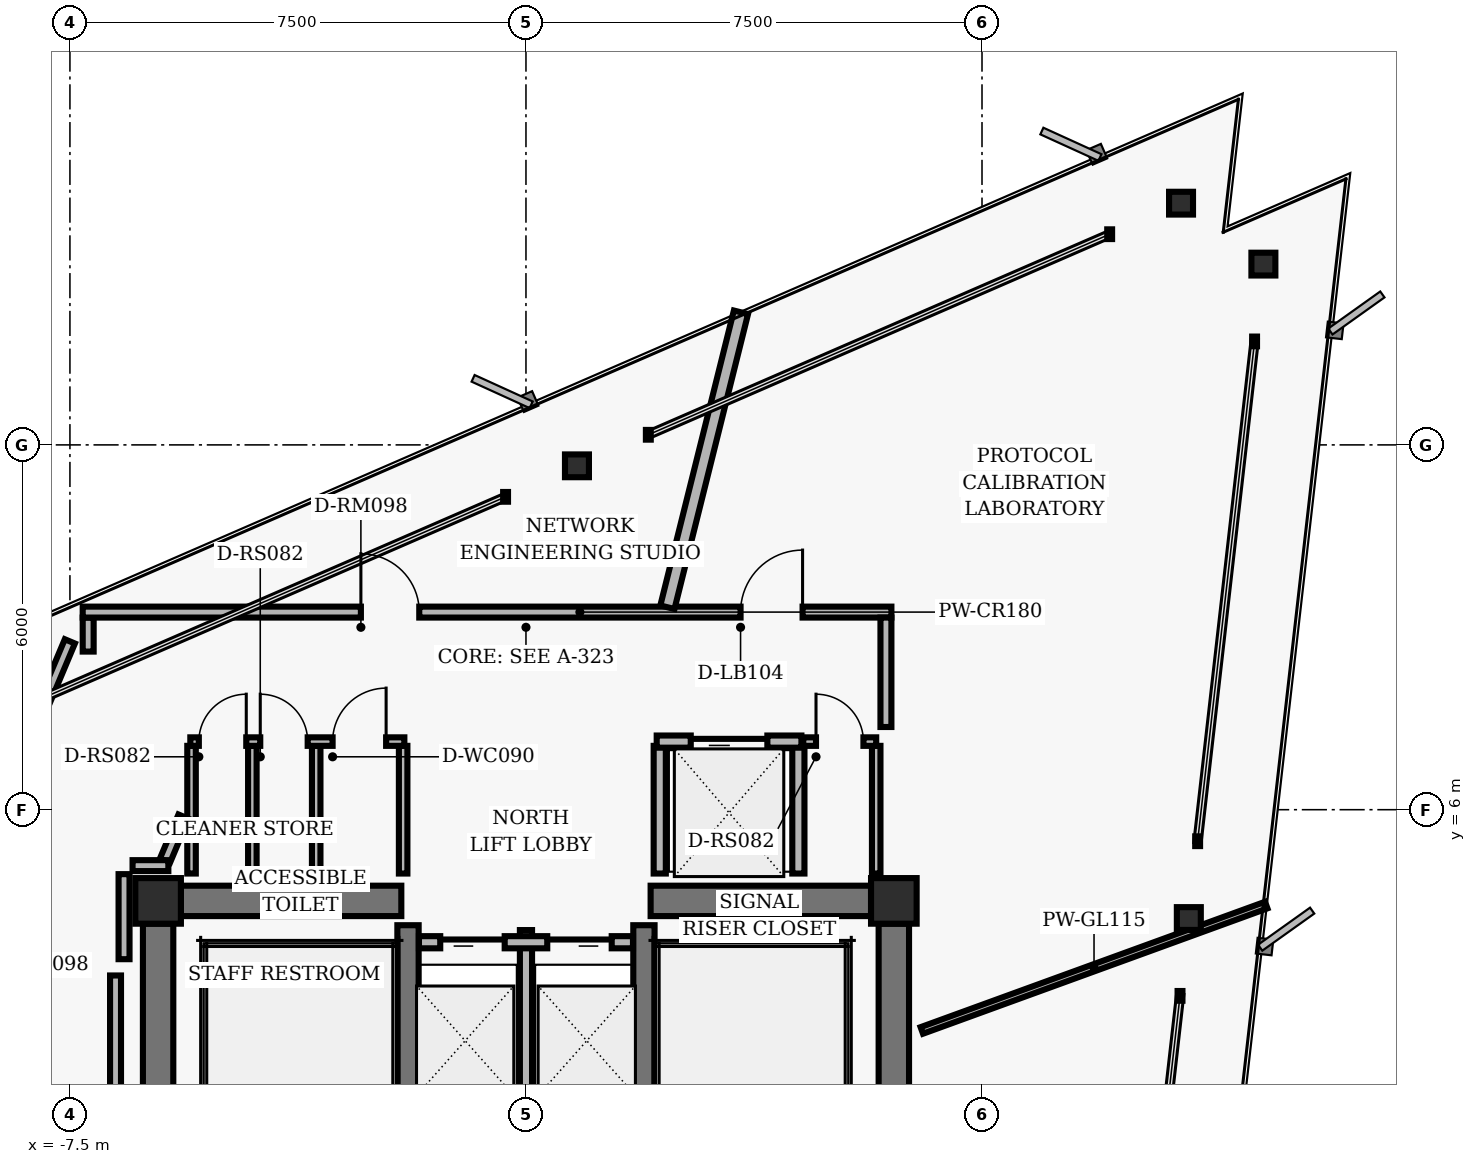
"""IFC4 building model, lengths in metres.
Left out: names, types, materials, properties, quantities, classifications, styles, units other than length and angle.
Written with IfcOpenShell. Run it as: python <this file> out.ifc"""

import sys

from ifc_helpers import new_model, si_unit, direction, frame, frame_2d, origin, origin_2d, place, context, subcontext, project, spatial, rectangle, hollow_rectangle, i_section, extrude, element, fill, save


model = new_model("IFC4")
c1 = context("Model", 3, precision=1e-05, world=origin(), true_north=direction((0.0, 1.0)))
c2 = subcontext(c1, "Body", "Model", "MODEL_VIEW")
j1 = project(units=[si_unit("LENGTHUNIT", "METRE"), si_unit("PLANEANGLEUNIT", "RADIAN")], contexts=[c1])
p1 = place(None, origin())
s1 = spatial("IfcSite", under=j1, at=p1, CompositionType="ELEMENT")
p2 = place(p1, origin())
s2 = spatial("IfcBuilding", under=s1, at=p2, CompositionType="ELEMENT")
p3 = place(p2, frame((0.0, 0.0, 217.92)))
s3 = spatial("IfcBuildingStorey", under=s2, at=p3, CompositionType="ELEMENT", Elevation=217.92)
for number, where, z_axis, x_axis in (
    (1, (-6.05, 4.5, 0.0), (0.0, 0.0, 1.0), (1.0, 0.0, 0.0)),
    (2, (6.05, 4.5, 0.0), (0.0, 0.0, 1.0), (1.0, 0.0, 0.0)),
):
    element("IfcColumn", number, at=place(p3, frame(where, z_axis=z_axis, x_axis=x_axis)), inside=s3, PredefinedType="COLUMN", context=c2, shape_type="SweptSolid", body=[
        extrude(hollow_rectangle(XDim=0.75, YDim=0.75, WallThickness=0.05, InnerFilletRadius=0.02, OuterFilletRadius=0.04, at=origin_2d()), origin(), (0.0, 0.0, 1.0), 3.04),
    ])
for number, where, z_axis, x_axis in (
    (3, (-6.05, 0.375, 0.0), (0.0, 0.0, 1.0), (0.0, 1.0, 0.0)),
    (4, (6.05, 0.375, 0.0), (0.0, 0.0, 1.0), (0.0, 1.0, 0.0)),
):
    element("IfcWall", number, at=place(p3, frame(where, z_axis=z_axis, x_axis=x_axis)), inside=s3, PredefinedType="SHEAR", context=c2, shape_type="SweptSolid", body=[
        extrude(rectangle(XDim=3.75, YDim=0.5, at=frame_2d((1.875, 0.0))), origin(), (0.0, 0.0, 1.0), 2.798),
    ])
for number, where, z_axis, x_axis in (
    (5, (-1.94, -4.1, 0.0), (0.0, 0.0, 1.0), (0.0, 1.0, 0.0)),
    (6, (1.94, -4.1, 0.0), (0.0, 0.0, 1.0), (0.0, 1.0, 0.0)),
):
    element("IfcWall", number, at=place(p3, frame(where, z_axis=z_axis, x_axis=x_axis)), inside=s3, PredefinedType="SHEAR", context=c2, shape_type="SweptSolid", body=[
        extrude(rectangle(XDim=8.2, YDim=0.35, at=frame_2d((4.1, 0.0))), origin(), (0.0, 0.0, 1.0), 2.798),
    ])
for number, where, z_axis, x_axis in (
    (7, (-5.675, 4.5, 0.0), (0.0, 0.0, 1.0), (1.0, 0.0, 0.0)),
    (8, (2.05, 4.5, 0.0), (0.0, 0.0, 1.0), (1.0, 0.0, 0.0)),
):
    element("IfcWall", number, at=place(p3, frame(where, z_axis=z_axis, x_axis=x_axis)), inside=s3, PredefinedType="SHEAR", context=c2, shape_type="SweptSolid", body=[
        extrude(rectangle(XDim=3.625, YDim=0.5, at=frame_2d((1.812, 0.0))), origin(), (0.0, 0.0, 1.0), 2.798),
    ])
for number, where, z_axis, x_axis in (
    (9, (10.901, 4.21, 0.0), (0.0, 0.0, 1.0), (1.0, 0.0, 0.0)),
    (10, (12.128, 14.973, 0.0), (0.0, 0.0, 1.0), (1.0, 0.0, 0.0)),
    (11, (10.773, 15.976, 0.0), (0.0, 0.0, 1.0), (1.0, 0.0, 0.0)),
    (12, (0.838, 11.656, 0.0), (0.0, 0.0, 1.0), (1.0, 0.0, 0.0)),
):
    element("IfcColumn", number, at=place(p3, frame(where, z_axis=z_axis, x_axis=x_axis)), inside=s3, PredefinedType="COLUMN", context=c2, shape_type="SweptSolid", body=[
        extrude(i_section(OverallWidth=0.394, OverallDepth=0.375, WebThickness=0.017, FlangeThickness=0.028, FilletRadius=0.016, at=origin_2d()), origin(), (0.0, 0.0, 1.0), 3.04),
    ])
p4 = place(p3, frame((0.0, 1.25, 0.0), z_axis=(0.0, 0.0, 1.0), x_axis=(0.0, 1.0, 0.0)))
e13 = element("IfcWall", 13, at=p4, inside=s3, PredefinedType="PARTITIONING", context=c2, shape_type="SweptSolid", body=[
    extrude(rectangle(XDim=2.77, YDim=0.2, at=frame_2d((1.385, 0.0))), origin(), (0.0, 0.0, 1.0), 2.773),
])
p5 = place(p3, frame((-1.76, 3.82, 0.0), z_axis=(0.0, 0.0, 1.0), x_axis=(1.0, 0.0, 0.0)))
e14 = element("IfcWall", 14, at=p5, inside=s3, PredefinedType="PARTITIONING", context=c2, shape_type="SweptSolid", body=[
    extrude(rectangle(XDim=3.52, YDim=0.2, at=frame_2d((1.76, 0.0))), origin(), (0.0, 0.0, 1.0), 2.773),
])
p6 = place(p5, frame((0.35, 0.0, 0.0)))
e15 = element("IfcOpeningElement", 15, at=p6, cuts=e14, PredefinedType="OPENING", context=c2, shape_type="SweptSolid", body=[
    extrude(rectangle(XDim=1.06, YDim=2.04, at=frame_2d((0.53, 1.02))), frame((0.0, 0.11, 0.0), z_axis=(0.0, -1.0, 0.0), x_axis=(1.0, 0.0, 0.0)), (0.0, 0.0, 1.0), 0.22),
])
p7 = place(p5, frame((2.11, 0.0, 0.0)))
e16 = element("IfcOpeningElement", 16, at=p7, cuts=e14, PredefinedType="OPENING", context=c2, shape_type="SweptSolid", body=[
    extrude(rectangle(XDim=1.06, YDim=2.04, at=frame_2d((0.53, 1.02))), frame((0.0, 0.11, 0.0), z_axis=(0.0, -1.0, 0.0), x_axis=(1.0, 0.0, 0.0)), (0.0, 0.0, 1.0), 0.22),
])
for number, where, z_axis, x_axis in (
    (17, (2.2, 4.95, 0.0), (0.0, 0.0, 1.0), (0.0, 1.0, 0.0)),
    (18, (4.48, 4.95, 0.0), (0.0, 0.0, 1.0), (0.0, 1.0, 0.0)),
):
    element("IfcWall", number, at=place(p3, frame(where, z_axis=z_axis, x_axis=x_axis)), inside=s3, PredefinedType="PARTITIONING", context=c2, shape_type="SweptSolid", body=[
        extrude(rectangle(XDim=2.1, YDim=0.2, at=frame_2d((1.05, 0.0))), origin(), (0.0, 0.0, 1.0), 2.773),
    ])
p8 = place(p3, frame((2.15, 7.12, 0.0), z_axis=(0.0, 0.0, 1.0), x_axis=(1.0, 0.0, 0.0)))
e19 = element("IfcWall", 19, at=p8, inside=s3, PredefinedType="PARTITIONING", context=c2, shape_type="SweptSolid", body=[
    extrude(rectangle(XDim=2.38, YDim=0.2, at=frame_2d((1.19, 0.0))), origin(), (0.0, 0.0, 1.0), 2.395),
])
p9 = place(p8, frame((0.56, 0.0, 0.0)))
e20 = element("IfcOpeningElement", 20, at=p9, cuts=e19, PredefinedType="OPENING", context=c2, shape_type="SweptSolid", body=[
    extrude(rectangle(XDim=1.26, YDim=2.06, at=frame_2d((0.63, 1.03))), frame((0.0, 0.11, 0.0), z_axis=(0.0, -1.0, 0.0), x_axis=(1.0, 0.0, 0.0)), (0.0, 0.0, 1.0), 0.22),
])
for number, where, z_axis, x_axis in (
    (21, (-5.5, 4.95, 0.0), (0.0, 0.0, 1.0), (0.0, 1.0, 0.0)),
    (22, (-4.5, 4.95, 0.0), (0.0, 0.0, 1.0), (0.0, 1.0, 0.0)),
    (23, (-3.45, 4.95, 0.0), (0.0, 0.0, 1.0), (0.0, 1.0, 0.0)),
    (24, (-2.02, 4.95, 0.0), (0.0, 0.0, 1.0), (0.0, 1.0, 0.0)),
):
    element("IfcWall", number, at=place(p3, frame(where, z_axis=z_axis, x_axis=x_axis)), inside=s3, PredefinedType="PARTITIONING", context=c2, shape_type="SweptSolid", body=[
        extrude(rectangle(XDim=2.1, YDim=0.14, at=frame_2d((1.05, 0.0))), origin(), (0.0, 0.0, 1.0), 2.773),
    ])
p10 = place(p3, frame((-5.52, 7.12, 0.0), z_axis=(0.0, 0.0, 1.0), x_axis=(1.0, 0.0, 0.0)))
e25 = element("IfcWall", 25, at=p10, inside=s3, PredefinedType="PARTITIONING", context=c2, shape_type="SweptSolid", body=[
    extrude(rectangle(XDim=3.52, YDim=0.14, at=frame_2d((1.76, 0.0))), origin(), (0.0, 0.0, 1.0), 2.395),
])
p11 = place(p10, frame((0.14, 0.0, 0.0)))
e26 = element("IfcOpeningElement", 26, at=p11, cuts=e25, PredefinedType="OPENING", context=c2, shape_type="SweptSolid", body=[
    extrude(rectangle(XDim=0.78, YDim=2.01, at=frame_2d((0.39, 1.005))), frame((0.0, 0.08, 0.0), z_axis=(0.0, -1.0, 0.0), x_axis=(1.0, 0.0, 0.0)), (0.0, 0.0, 1.0), 0.16),
])
p12 = place(p10, frame((1.15, 0.0, 0.0)))
e27 = element("IfcOpeningElement", 27, at=p12, cuts=e25, PredefinedType="OPENING", context=c2, shape_type="SweptSolid", body=[
    extrude(rectangle(XDim=0.78, YDim=2.01, at=frame_2d((0.39, 1.005))), frame((0.0, 0.08, 0.0), z_axis=(0.0, -1.0, 0.0), x_axis=(1.0, 0.0, 0.0)), (0.0, 0.0, 1.0), 0.16),
])
p13 = place(p10, frame((2.34, 0.0, 0.0)))
e28 = element("IfcOpeningElement", 28, at=p13, cuts=e25, PredefinedType="OPENING", context=c2, shape_type="SweptSolid", body=[
    extrude(rectangle(XDim=0.88, YDim=2.02, at=frame_2d((0.44, 1.01))), frame((0.0, 0.08, 0.0), z_axis=(0.0, -1.0, 0.0), x_axis=(1.0, 0.0, 0.0)), (0.0, 0.0, 1.0), 0.16),
])
p14 = place(p3, frame((5.76, 4.95, 0.0), z_axis=(0.0, 0.0, 1.0), x_axis=(0.0, 1.0, 0.0)))
e29 = element("IfcWall", 29, at=p14, inside=s3, PredefinedType="PARTITIONING", context=c2, shape_type="SweptSolid", body=[
    extrude(rectangle(XDim=2.1, YDim=0.14, at=frame_2d((1.05, 0.0))), origin(), (0.0, 0.0, 1.0), 2.773),
])
p15 = place(p3, frame((4.56, 7.12, 0.0), z_axis=(0.0, 0.0, 1.0), x_axis=(1.0, 0.0, 0.0)))
e30 = element("IfcWall", 30, at=p15, inside=s3, PredefinedType="PARTITIONING", context=c2, shape_type="SweptSolid", body=[
    extrude(rectangle(XDim=1.2, YDim=0.14, at=frame_2d((0.6, 0.0))), origin(), (0.0, 0.0, 1.0), 2.773),
])
p16 = place(p15, frame((0.21, 0.0, 0.0)))
e31 = element("IfcOpeningElement", 31, at=p16, cuts=e30, PredefinedType="OPENING", context=c2, shape_type="SweptSolid", body=[
    extrude(rectangle(XDim=0.78, YDim=2.01, at=frame_2d((0.39, 1.005))), frame((0.0, 0.08, 0.0), z_axis=(0.0, -1.0, 0.0), x_axis=(1.0, 0.0, 0.0)), (0.0, 0.0, 1.0), 0.16),
])
p17 = place(p3, frame((-9.367, 4.332, 0.0), z_axis=(0.0, 0.0, 1.0), x_axis=(0.387573945081, 0.921838617706, 0.0)))
e32 = element("IfcWall", 32, at=p17, inside=s3, PredefinedType="PARTITIONING", context=c2, shape_type="SweptSolid", body=[
    extrude(rectangle(XDim=4.813, YDim=0.18, at=frame_2d((2.407, 0.0))), origin(), (0.0, 0.0, 1.0), 2.773),
])
p18 = place(p17, frame((0.302, 0.0, 0.0)))
e33 = element("IfcOpeningElement", 33, at=p18, cuts=e32, PredefinedType="OPENING", context=c2, shape_type="SweptSolid", body=[
    extrude(rectangle(XDim=0.96, YDim=2.02, at=frame_2d((0.48, 1.01))), frame((0.0, 0.1, 0.0), z_axis=(0.0, -1.0, 0.0), x_axis=(1.0, 0.0, 0.0)), (0.0, 0.0, 1.0), 0.2),
])
p19 = place(p3, frame((-7.2, 8.601, 0.0), z_axis=(0.0, 0.0, 1.0), x_axis=(0.0, 1.0, 0.0)))
e34 = element("IfcWall", 34, at=p19, inside=s3, PredefinedType="PARTITIONING", context=c2, shape_type="SweptSolid", body=[
    extrude(rectangle(XDim=0.559, YDim=0.18, at=frame_2d((0.28, 0.0))), origin(), (0.0, 0.0, 1.0), 2.773),
])
p20 = place(p3, frame((-7.29, 9.25, 0.0), z_axis=(0.0, 0.0, 1.0), x_axis=(1.0, 0.0, 0.0)))
e35 = element("IfcWall", 35, at=p20, inside=s3, PredefinedType="PARTITIONING", context=c2, shape_type="SweptSolid", body=[
    extrude(rectangle(XDim=13.3, YDim=0.18, at=frame_2d((6.65, 0.0))), origin(), (0.0, 0.0, 1.0), 2.395),
])
p21 = place(p20, frame((10.819, 0.0, 0.0)))
e36 = element("IfcOpeningElement", 36, at=p21, cuts=e35, PredefinedType="OPENING", context=c2, shape_type="SweptSolid", body=[
    extrude(rectangle(XDim=1.02, YDim=2.02, at=frame_2d((0.51, 1.01))), frame((0.0, 0.1, 0.0), z_axis=(0.0, -1.0, 0.0), x_axis=(1.0, 0.0, 0.0)), (0.0, 0.0, 1.0), 0.2),
])
p22 = place(p20, frame((4.575, 0.0, 0.0)))
e37 = element("IfcOpeningElement", 37, at=p22, cuts=e35, PredefinedType="OPENING", context=c2, shape_type="SweptSolid", body=[
    extrude(rectangle(XDim=0.96, YDim=2.02, at=frame_2d((0.48, 1.01))), frame((0.0, 0.1, 0.0), z_axis=(0.0, -1.0, 0.0), x_axis=(1.0, 0.0, 0.0)), (0.0, 0.0, 1.0), 0.2),
])
p23 = place(p3, frame((5.92, 9.16, 0.0), z_axis=(0.0, 0.0, 1.0), x_axis=(0.0, -1.0, 0.0)))
e38 = element("IfcWall", 38, at=p23, inside=s3, PredefinedType="PARTITIONING", context=c2, shape_type="SweptSolid", body=[
    extrude(rectangle(XDim=1.8, YDim=0.18, at=frame_2d((0.9, 0.0))), origin(), (0.0, 0.0, 1.0), 2.773),
])
p24 = place(p3, frame((-5.632, 5.887, 0.0), z_axis=(0.0, 0.0, 1.0), x_axis=(-0.387792833522, -0.921746558588, 0.0)))
e39 = element("IfcWall", 39, at=p24, inside=s3, PredefinedType="PARTITIONING", context=c2, shape_type="SweptSolid", body=[
    extrude(rectangle(XDim=0.785, YDim=0.18, at=frame_2d((0.393, 0.0))), origin(), (0.0, 0.0, 1.0), 2.773),
])
p25 = place(p3, frame((-5.881, 5.08, 0.0), z_axis=(0.0, 0.0, 1.0), x_axis=(-1.0, 0.0, 0.0)))
e40 = element("IfcWall", 40, at=p25, inside=s3, PredefinedType="PARTITIONING", context=c2, shape_type="SweptSolid", body=[
    extrude(rectangle(XDim=0.589, YDim=0.18, at=frame_2d((0.294, 0.0))), origin(), (0.0, 0.0, 1.0), 2.773),
])
p26 = place(p3, frame((-6.61, 4.94, 0.0), z_axis=(0.0, 0.0, 1.0), x_axis=(0.0, -1.0, 0.0)))
e41 = element("IfcWall", 41, at=p26, inside=s3, PredefinedType="PARTITIONING", context=c2, shape_type="SweptSolid", body=[
    extrude(rectangle(XDim=1.399, YDim=0.18, at=frame_2d((0.699, 0.0))), origin(), (0.0, 0.0, 1.0), 2.773),
])
p27 = place(p3, frame((-6.75, 3.273, 0.0), z_axis=(0.0, 0.0, 1.0), x_axis=(0.0, -1.0, 0.0)))
e42 = element("IfcWall", 42, at=p27, inside=s3, PredefinedType="PARTITIONING", context=c2, shape_type="SweptSolid", body=[
    extrude(rectangle(XDim=6.547, YDim=0.18, at=frame_2d((3.273, 0.0))), origin(), (0.0, 0.0, 1.0), 2.773),
])
p28 = place(p3, frame((6.51, 2.369, 0.0), z_axis=(0.0, 0.0, 1.0), x_axis=(0.939690503952, 0.342025959222, 0.0)))
e43 = element("IfcWall", 43, at=p28, inside=s3, PredefinedType="MOVABLE", context=c2, shape_type="SweptSolid", body=[
    extrude(rectangle(XDim=6.028, YDim=0.115, at=frame_2d((3.014, 0.0))), origin(), (0.0, 0.0, 1.0), 2.773),
])
p29 = place(p3, frame((2.326, 9.33, 0.0), z_axis=(0.0, 0.0, 1.0), x_axis=(0.24192658113, 0.97029455803, 0.0)))
e44 = element("IfcWall", 44, at=p29, inside=s3, PredefinedType="PARTITIONING", context=c2, shape_type="SweptSolid", body=[
    extrude(rectangle(XDim=4.999, YDim=0.24, at=frame_2d((2.5, 0.0))), origin(), (0.0, 0.0, 1.0), 2.773),
])
p30 = place(p6, origin())
e45 = element("IfcDoor", 45, at=p30, inside=s3, OperationType="SLIDING_TO_LEFT", PredefinedType="DOOR", context=c2, shape_type="SweptSolid", body=[
    extrude(rectangle(XDim=1.06, YDim=2.04, at=frame_2d((0.53, 1.02))), frame((0.0, 0.025, 0.0), z_axis=(0.0, -1.0, 0.0), x_axis=(1.0, 0.0, 0.0)), (0.0, 0.0, 1.0), 0.05),
])
fill(e15, e45)
p31 = place(p7, origin())
e46 = element("IfcDoor", 46, at=p31, inside=s3, OperationType="SLIDING_TO_RIGHT", PredefinedType="DOOR", context=c2, shape_type="SweptSolid", body=[
    extrude(rectangle(XDim=1.06, YDim=2.04, at=frame_2d((0.53, 1.02))), frame((0.0, 0.025, 0.0), z_axis=(0.0, -1.0, 0.0), x_axis=(1.0, 0.0, 0.0)), (0.0, 0.0, 1.0), 0.05),
])
fill(e16, e46)
p32 = place(p9, origin())
e47 = element("IfcDoor", 47, at=p32, inside=s3, OperationType="SLIDING_TO_LEFT", PredefinedType="DOOR", context=c2, shape_type="SweptSolid", body=[
    extrude(rectangle(XDim=1.26, YDim=2.06, at=frame_2d((0.63, 1.03))), frame((0.0, 0.025, 0.0), z_axis=(0.0, -1.0, 0.0), x_axis=(1.0, 0.0, 0.0)), (0.0, 0.0, 1.0), 0.05),
])
fill(e20, e47)
p33 = place(p11, origin())
e48 = element("IfcDoor", 48, at=p33, inside=s3, OperationType="SINGLE_SWING_RIGHT", PredefinedType="DOOR", context=c2, shape_type="SweptSolid", body=[
    extrude(rectangle(XDim=0.78, YDim=2.01, at=frame_2d((0.39, 1.005))), frame((0.0, 0.025, 0.0), z_axis=(0.0, -1.0, 0.0), x_axis=(1.0, 0.0, 0.0)), (0.0, 0.0, 1.0), 0.05),
])
fill(e26, e48)
p34 = place(p12, origin())
e49 = element("IfcDoor", 49, at=p34, inside=s3, OperationType="SINGLE_SWING_LEFT", PredefinedType="DOOR", context=c2, shape_type="SweptSolid", body=[
    extrude(rectangle(XDim=0.78, YDim=2.01, at=frame_2d((0.39, 1.005))), frame((0.0, 0.025, 0.0), z_axis=(0.0, -1.0, 0.0), x_axis=(1.0, 0.0, 0.0)), (0.0, 0.0, 1.0), 0.05),
])
fill(e27, e49)
p35 = place(p13, origin())
e50 = element("IfcDoor", 50, at=p35, inside=s3, OperationType="SINGLE_SWING_RIGHT", PredefinedType="DOOR", context=c2, shape_type="SweptSolid", body=[
    extrude(rectangle(XDim=0.88, YDim=2.02, at=frame_2d((0.44, 1.01))), frame((0.0, 0.025, 0.0), z_axis=(0.0, -1.0, 0.0), x_axis=(1.0, 0.0, 0.0)), (0.0, 0.0, 1.0), 0.05),
])
fill(e28, e50)
p36 = place(p16, origin())
e51 = element("IfcDoor", 51, at=p36, inside=s3, OperationType="SINGLE_SWING_LEFT", PredefinedType="DOOR", context=c2, shape_type="SweptSolid", body=[
    extrude(rectangle(XDim=0.78, YDim=2.01, at=frame_2d((0.39, 1.005))), frame((0.0, 0.025, 0.0), z_axis=(0.0, -1.0, 0.0), x_axis=(1.0, 0.0, 0.0)), (0.0, 0.0, 1.0), 0.05),
])
fill(e31, e51)
p37 = place(p21, origin())
e52 = element("IfcDoor", 52, at=p37, inside=s3, OperationType="SINGLE_SWING_RIGHT", PredefinedType="DOOR", context=c2, shape_type="SweptSolid", body=[
    extrude(rectangle(XDim=1.02, YDim=2.02, at=frame_2d((0.51, 1.01))), frame((0.0, 0.025, 0.0), z_axis=(0.0, -1.0, 0.0), x_axis=(1.0, 0.0, 0.0)), (0.0, 0.0, 1.0), 0.05),
])
fill(e36, e52)
p38 = place(p22, origin())
e53 = element("IfcDoor", 53, at=p38, inside=s3, OperationType="SINGLE_SWING_LEFT", PredefinedType="DOOR", context=c2, shape_type="SweptSolid", body=[
    extrude(rectangle(XDim=0.96, YDim=2.02, at=frame_2d((0.48, 1.01))), frame((0.0, 0.025, 0.0), z_axis=(0.0, -1.0, 0.0), x_axis=(1.0, 0.0, 0.0)), (0.0, 0.0, 1.0), 0.05),
])
fill(e37, e53)
save(model, sys.argv[1])
